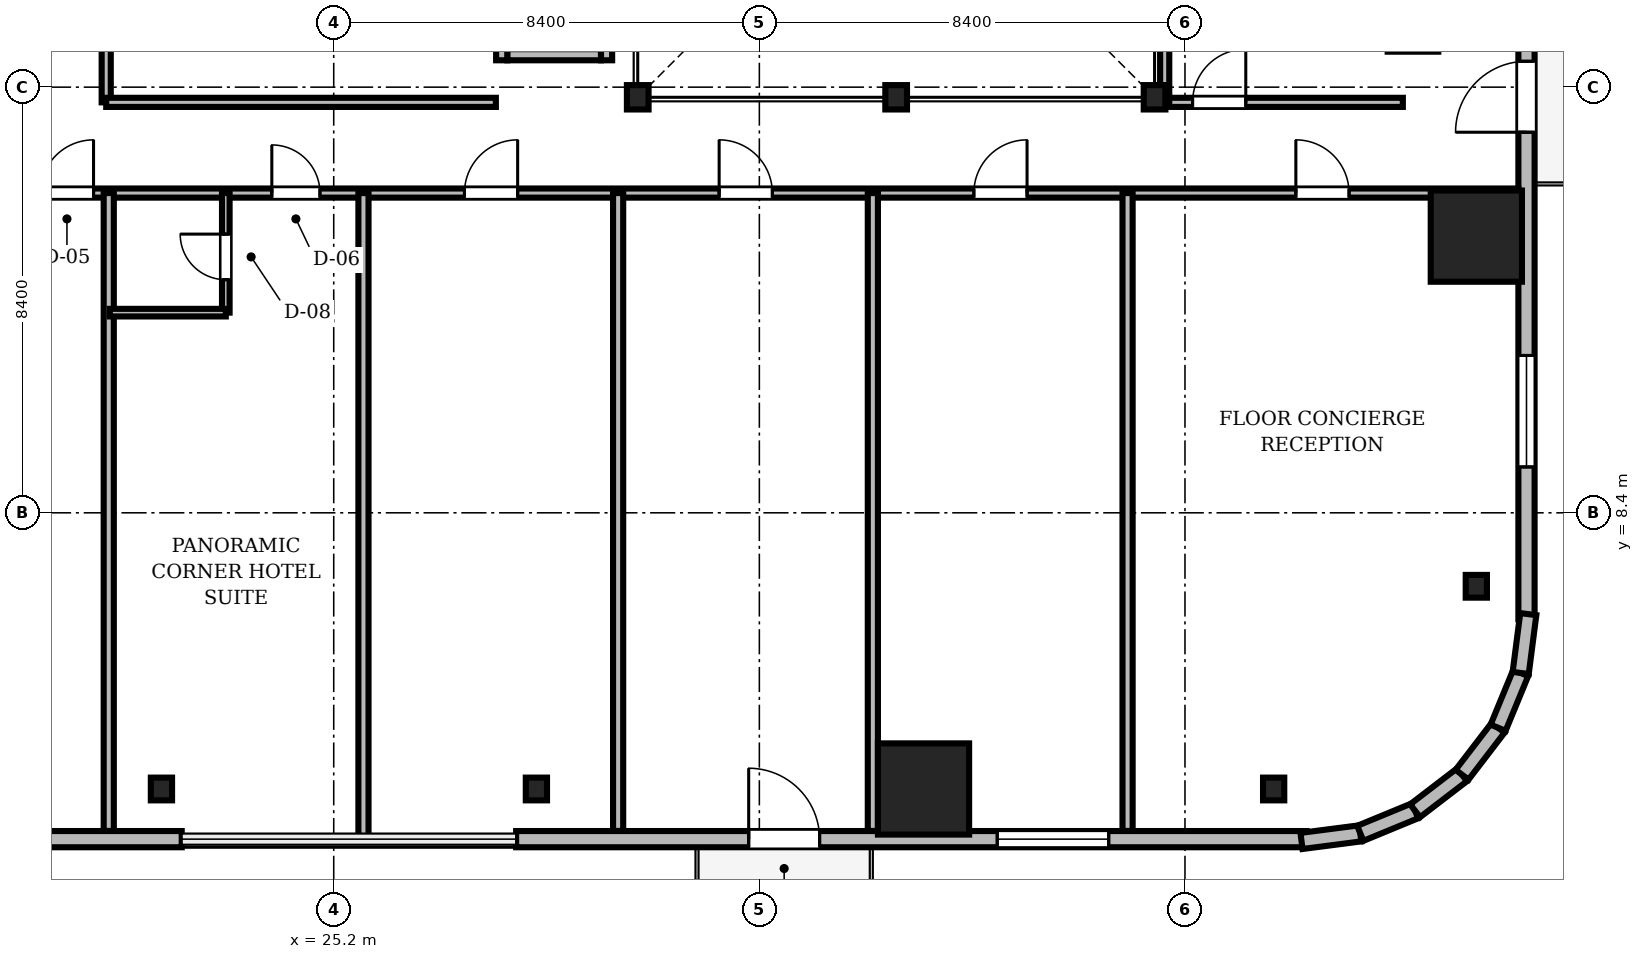
"""IFC4 building model, lengths in metres.
Left out: names, types, materials, properties, quantities, classifications, styles, units other than length and angle.
Written with IfcOpenShell. Run it as: python <this file> out.ifc"""

import sys

from ifc_helpers import new_model, si_unit, direction, frame, frame_2d, origin, origin_2d, place, context, subcontext, project, spatial, rectangle, i_section, extrude, source, transform, mapped, element, fill, save


model = new_model("IFC4")
c1 = context("Model", 3, precision=1e-05, world=origin(), true_north=direction((0.0, 1.0)))
c2 = subcontext(c1, "Body", "Model", "MODEL_VIEW")
j1 = project(units=[si_unit("LENGTHUNIT", "METRE"), si_unit("PLANEANGLEUNIT", "RADIAN")], contexts=[c1])
p1 = place(None, origin())
s1 = spatial("IfcSite", under=j1, at=p1, CompositionType="ELEMENT")
p2 = place(p1, origin())
s2 = spatial("IfcBuilding", under=s1, at=p2, CompositionType="ELEMENT")
p3 = place(p2, frame((0.0, 0.0, 38.55)))
s3 = spatial("IfcBuildingStorey", under=s2, at=p3, CompositionType="ELEMENT", Elevation=38.55)
m1 = source(origin(), c2, "Body", "SweptSolid", [
    extrude(i_section(OverallWidth=0.428, OverallDepth=0.481, WebThickness=0.04, FlangeThickness=0.063, FilletRadius=0.015, at=origin_2d()), origin(), (0.0, 0.0, 1.0), 3.41),
])
for number, where, z_axis, x_axis in (
    (1, (31.2, 16.6, 0.0), (0.0, 0.0, 1.0), (1.0, 0.0, 0.0)),
    (2, (36.3, 16.6, 0.0), (0.0, 0.0, 1.0), (1.0, 0.0, 0.0)),
    (3, (41.4, 16.6, 0.0), (0.0, 0.0, 1.0), (1.0, 0.0, 0.0)),
):
    element("IfcColumn", number, at=place(p3, frame(where, z_axis=z_axis, x_axis=x_axis)), inside=s3, PredefinedType="COLUMN", context=c2, shape_type="MappedRepresentation", body=[
        mapped(m1, transform((0.0, 0.0, 0.0), scale=1.0)),
    ])
m2 = source(origin(), c2, "Body", "SweptSolid", [
    extrude(rectangle(XDim=1.8, YDim=1.8, at=origin_2d()), origin(), (0.0, 0.0, 1.0), 3.41),
])
for number, where, z_axis, x_axis in (
    (4, (36.84, 2.95, 0.0), (0.0, 0.0, 1.0), (1.0, 0.0, 0.0)),
    (5, (47.75, 13.86, 0.0), (0.0, 0.0, 1.0), (1.0, 0.0, 0.0)),
):
    element("IfcColumn", number, at=place(p3, frame(where, z_axis=z_axis, x_axis=x_axis)), inside=s3, PredefinedType="COLUMN", context=c2, shape_type="MappedRepresentation", body=[
        mapped(m2, transform((0.0, 0.0, 0.0), scale=1.0)),
    ])
m3 = source(origin(), c2, "Body", "SweptSolid", [
    extrude(i_section(OverallWidth=0.419, OverallDepth=0.449, WebThickness=0.031, FlangeThickness=0.048, FilletRadius=0.015, at=origin_2d()), origin(), (0.0, 0.0, 1.0), 3.41),
])
for number, where, z_axis, x_axis in (
    (6, (21.8, 2.95, 0.0), (0.0, 0.0, 1.0), (1.0, 0.0, 0.0)),
    (7, (29.2, 2.95, 0.0), (0.0, 0.0, 1.0), (1.0, 0.0, 0.0)),
    (8, (43.75, 2.95, 0.0), (0.0, 0.0, 1.0), (1.0, 0.0, 0.0)),
    (9, (47.75, 6.95, 0.0), (0.0, 0.0, 1.0), (1.0, 0.0, 0.0)),
):
    element("IfcColumn", number, at=place(p3, frame(where, z_axis=z_axis, x_axis=x_axis)), inside=s3, PredefinedType="COLUMN", context=c2, shape_type="MappedRepresentation", body=[
        mapped(m3, transform((0.0, 0.0, 0.0), scale=1.0)),
    ])
m4 = source(origin(), c2, "Body", "SweptSolid", [
    extrude(rectangle(XDim=15.6, YDim=0.32, at=frame_2d((7.8, 0.0))), origin(), (0.0, 0.0, 1.0), 3.41),
])
p4 = place(p3, frame((6.6, 1.96, 0.0), z_axis=(0.0, 0.0, 1.0), x_axis=(1.0, 0.0, 0.0)))
e10 = element("IfcWall", 10, at=p4, inside=s3, PredefinedType="SOLIDWALL", context=c2, shape_type="MappedRepresentation", body=[
    mapped(m4, transform((0.0, 0.0, 0.0), scale=1.0)),
])
m5 = source(origin(), c2, "Body", "SweptSolid", [
    extrude(rectangle(XDim=2.2, YDim=2.4, at=frame_2d((1.1, 1.2))), frame((0.0, 0.17, 0.0), z_axis=(0.0, -1.0, 0.0), x_axis=(1.0, 0.0, 0.0)), (0.0, 0.0, 1.0), 0.34),
])
p5 = place(p4, frame((3.005, 0.0, 0.72)))
e11 = element("IfcOpeningElement", 11, at=p5, cuts=e10, PredefinedType="OPENING", context=c2, shape_type="MappedRepresentation", body=[
    mapped(m5, transform((0.0, 0.0, 0.0), scale=1.0)),
])
p6 = place(p3, frame((28.8, 1.96, 0.0), z_axis=(0.0, 0.0, 1.0), x_axis=(1.0, 0.0, 0.0)))
e12 = element("IfcWall", 12, at=p6, inside=s3, PredefinedType="SOLIDWALL", context=c2, shape_type="MappedRepresentation", body=[
    mapped(m4, transform((0.0, 0.0, 0.0), scale=1.0)),
])
m6 = source(origin(), c2, "Body", "SweptSolid", [
    extrude(rectangle(XDim=1.4, YDim=2.3, at=frame_2d((0.7, 1.15))), frame((0.0, 0.17, 0.0), z_axis=(0.0, -1.0, 0.0), x_axis=(1.0, 0.0, 0.0)), (0.0, 0.0, 1.0), 0.34),
])
p7 = place(p6, frame((4.59, 0.0, 0.0)))
e13 = element("IfcOpeningElement", 13, at=p7, cuts=e12, PredefinedType="OPENING", context=c2, shape_type="MappedRepresentation", body=[
    mapped(m6, transform((0.0, 0.0, 0.0), scale=1.0)),
])
p8 = place(p6, frame((9.495, 0.0, 0.72)))
e14 = element("IfcOpeningElement", 14, at=p8, cuts=e12, PredefinedType="OPENING", context=c2, shape_type="MappedRepresentation", body=[
    mapped(m5, transform((0.0, 0.0, 0.0), scale=1.0)),
])
p9 = place(p3, frame((48.74, 6.3, 0.0), z_axis=(0.0, 0.0, 1.0), x_axis=(0.0, 1.0, 0.0)))
e15 = element("IfcWall", 15, at=p9, inside=s3, PredefinedType="SOLIDWALL", context=c2, shape_type="MappedRepresentation", body=[
    mapped(m4, transform((0.0, 0.0, 0.0), scale=1.0)),
])
p10 = place(p9, frame((9.61, 0.0, 0.0)))
e16 = element("IfcOpeningElement", 16, at=p10, cuts=e15, PredefinedType="OPENING", context=c2, shape_type="MappedRepresentation", body=[
    mapped(m6, transform((0.0, 0.0, 0.0), scale=1.0)),
])
p11 = place(p9, frame((3.005, 0.0, 0.72)))
e17 = element("IfcOpeningElement", 17, at=p11, cuts=e15, PredefinedType="OPENING", context=c2, shape_type="MappedRepresentation", body=[
    mapped(m5, transform((0.0, 0.0, 0.0), scale=1.0)),
])
m7 = source(origin(), c2, "Body", "SweptSolid", [
    extrude(rectangle(XDim=1.17, YDim=0.32, at=frame_2d((0.585, 0.0))), origin(), (0.0, 0.0, 1.0), 3.41),
])
p12 = place(p3, frame((44.3, 1.925, 0.0), z_axis=(0.0, 0.0, 1.0), x_axis=(0.991762485493, 0.128090485085, 0.0)))
e18 = element("IfcWall", 18, at=p12, inside=s3, PredefinedType="SOLIDWALL", context=c2, shape_type="MappedRepresentation", body=[
    mapped(m7, transform((0.0, 0.0, 0.0), scale=1.0)),
])
m8 = source(origin(), c2, "Body", "SweptSolid", [
    extrude(rectangle(XDim=1.169, YDim=0.32, at=frame_2d((0.585, 0.0))), origin(), (0.0, 0.0, 1.0), 3.41),
])
p13 = place(p3, frame((45.46, 2.074, 0.0), z_axis=(0.0, 0.0, 1.0), x_axis=(0.924479075121, 0.381232789334, 0.0)))
e19 = element("IfcWall", 19, at=p13, inside=s3, PredefinedType="SOLIDWALL", context=c2, shape_type="MappedRepresentation", body=[
    mapped(m8, transform((0.0, 0.0, 0.0), scale=1.0)),
])
m9 = source(origin(), c2, "Body", "SweptSolid", [
    extrude(rectangle(XDim=1.169, YDim=0.32, at=frame_2d((0.584, 0.0))), origin(), (0.0, 0.0, 1.0), 3.41),
])
p14 = place(p3, frame((46.541, 2.52, 0.0), z_axis=(0.0, 0.0, 1.0), x_axis=(0.793663520347, 0.608356981114, 0.0)))
e20 = element("IfcWall", 20, at=p14, inside=s3, PredefinedType="SOLIDWALL", context=c2, shape_type="MappedRepresentation", body=[
    mapped(m9, transform((0.0, 0.0, 0.0), scale=1.0)),
])
m10 = source(origin(), c2, "Body", "SweptSolid", [
    extrude(rectangle(XDim=1.169, YDim=0.32, at=frame_2d((0.584, 0.0))), origin(), (0.0, 0.0, 1.0), 3.41),
])
for number, where, z_axis, x_axis in (
    (21, (47.469, 3.231, 0.0), (0.0, 0.0, 1.0), (0.608, 0.794, 0.0)),
    (22, (48.18, 4.159, 0.0), (0.0, 0.0, 1.0), (0.381, 0.925, 0.0)),
):
    element("IfcWall", number, at=place(p3, frame(where, z_axis=z_axis, x_axis=x_axis)), inside=s3, PredefinedType="SOLIDWALL", context=c2, shape_type="MappedRepresentation", body=[
        mapped(m10, transform((0.0, 0.0, 0.0), scale=1.0)),
    ])
m11 = source(origin(), c2, "Body", "SweptSolid", [
    extrude(rectangle(XDim=1.171, YDim=0.32, at=frame_2d((0.585, 0.0))), origin(), (0.0, 0.0, 1.0), 3.41),
])
p15 = place(p3, frame((48.625, 5.24, 0.0), z_axis=(0.0, 0.0, 1.0), x_axis=(0.128269133229, 0.991739395941, 0.0)))
e23 = element("IfcWall", 23, at=p15, inside=s3, PredefinedType="SOLIDWALL", context=c2, shape_type="MappedRepresentation", body=[
    mapped(m11, transform((0.0, 0.0, 0.0), scale=1.0)),
])
m12 = source(origin(), c2, "Body", "SweptSolid", [
    extrude(rectangle(XDim=1.85, YDim=0.22, at=frame_2d((0.925, 0.0))), origin(), (0.0, 0.0, 1.0), 3.41),
])
p16 = place(p3, frame((28.625, 17.44, 0.0), z_axis=(0.0, 0.0, 1.0), x_axis=(1.0, 0.0, 0.0)))
e24 = element("IfcWall", 24, at=p16, inside=s3, PredefinedType="SOLIDWALL", context=c2, shape_type="MappedRepresentation", body=[
    mapped(m12, transform((0.0, 0.0, 0.0), scale=1.0)),
])
m13 = source(origin(), c2, "Body", "SweptSolid", [
    extrude(rectangle(XDim=2.54, YDim=0.22, at=frame_2d((1.27, 0.0))), origin(), (0.0, 0.0, 1.0), 3.41),
])
for number, where, z_axis, x_axis in (
    (25, (28.515, 17.33, 0.0), (0.0, 0.0, 1.0), (0.0, 1.0, 0.0)),
    (26, (30.585, 17.33, 0.0), (0.0, 0.0, 1.0), (0.0, 1.0, 0.0)),
):
    element("IfcWall", number, at=place(p3, frame(where, z_axis=z_axis, x_axis=x_axis)), inside=s3, PredefinedType="SOLIDWALL", context=c2, shape_type="MappedRepresentation", body=[
        mapped(m13, transform((0.0, 0.0, 0.0), scale=1.0)),
    ])
m14 = source(origin(), c2, "Body", "SweptSolid", [
    extrude(rectangle(XDim=46.156, YDim=0.18, at=frame_2d((23.078, 0.0))), origin(), (0.0, 0.0, 1.0), 2.652),
])
p17 = place(p3, frame((2.422, 14.71, 0.0), z_axis=(0.0, 0.0, 1.0), x_axis=(1.0, 0.0, 0.0)))
e27 = element("IfcWall", 27, at=p17, inside=s3, PredefinedType="PARTITIONING", context=c2, shape_type="MappedRepresentation", body=[
    mapped(m14, transform((0.0, 0.0, 0.0), scale=1.0)),
])
m15 = source(origin(), c2, "Body", "SweptSolid", [
    extrude(rectangle(XDim=1.05, YDim=2.2, at=frame_2d((0.525, 1.1))), frame((0.0, 0.1, 0.0), z_axis=(0.0, -1.0, 0.0), x_axis=(1.0, 0.0, 0.0)), (0.0, 0.0, 1.0), 0.2),
])
p18 = place(p17, frame((16.988, 0.0, 0.0)))
e28 = element("IfcOpeningElement", 28, at=p18, cuts=e27, PredefinedType="OPENING", context=c2, shape_type="MappedRepresentation", body=[
    mapped(m15, transform((0.0, 0.0, 0.0), scale=1.0)),
])
m16 = source(origin(), c2, "Body", "SweptSolid", [
    extrude(rectangle(XDim=0.95, YDim=2.15, at=frame_2d((0.475, 1.075))), frame((0.0, 0.1, 0.0), z_axis=(0.0, -1.0, 0.0), x_axis=(1.0, 0.0, 0.0)), (0.0, 0.0, 1.0), 0.2),
])
p19 = place(p17, frame((21.556, 0.0, 0.0)))
e29 = element("IfcOpeningElement", 29, at=p19, cuts=e27, PredefinedType="OPENING", context=c2, shape_type="MappedRepresentation", body=[
    mapped(m16, transform((0.0, 0.0, 0.0), scale=1.0)),
])
p20 = place(p17, frame((25.358, 0.0, 0.0)))
e30 = element("IfcOpeningElement", 30, at=p20, cuts=e27, PredefinedType="OPENING", context=c2, shape_type="MappedRepresentation", body=[
    mapped(m15, transform((0.0, 0.0, 0.0), scale=1.0)),
])
p21 = place(p17, frame((30.385, 0.0, 0.0)))
e31 = element("IfcOpeningElement", 31, at=p21, cuts=e27, PredefinedType="OPENING", context=c2, shape_type="MappedRepresentation", body=[
    mapped(m15, transform((0.0, 0.0, 0.0), scale=1.0)),
])
p22 = place(p17, frame((35.411, 0.0, 0.0)))
e32 = element("IfcOpeningElement", 32, at=p22, cuts=e27, PredefinedType="OPENING", context=c2, shape_type="MappedRepresentation", body=[
    mapped(m15, transform((0.0, 0.0, 0.0), scale=1.0)),
])
p23 = place(p17, frame((41.766, 0.0, 0.0)))
e33 = element("IfcOpeningElement", 33, at=p23, cuts=e27, PredefinedType="OPENING", context=c2, shape_type="MappedRepresentation", body=[
    mapped(m15, transform((0.0, 0.0, 0.0), scale=1.0)),
])
m17 = source(origin(), c2, "Body", "SweptSolid", [
    extrude(rectangle(XDim=11.94, YDim=0.18, at=frame_2d((5.97, 0.0))), origin(), (0.0, 0.0, 1.0), 2.802),
])
p24 = place(p3, frame((20.71, 16.5, 0.0), z_axis=(0.0, 0.0, 1.0), x_axis=(0.0, 1.0, 0.0)))
e34 = element("IfcWall", 34, at=p24, inside=s3, PredefinedType="PARTITIONING", context=c2, shape_type="MappedRepresentation", body=[
    mapped(m17, transform((0.0, 0.0, 0.0), scale=1.0)),
])
p25 = place(p24, frame((4.5, 0.0, 0.0)))
e35 = element("IfcOpeningElement", 35, at=p25, cuts=e34, PredefinedType="OPENING", context=c2, shape_type="MappedRepresentation", body=[
    mapped(m15, transform((0.0, 0.0, 0.0), scale=1.0)),
])
m18 = source(origin(), c2, "Body", "SweptSolid", [
    extrude(rectangle(XDim=4.7, YDim=0.18, at=frame_2d((2.35, 0.0))), origin(), (0.0, 0.0, 1.0), 2.802),
])
p26 = place(p3, frame((41.6, 16.5, 0.0), z_axis=(0.0, 0.0, 1.0), x_axis=(1.0, 0.0, 0.0)))
e36 = element("IfcWall", 36, at=p26, inside=s3, PredefinedType="PARTITIONING", context=c2, shape_type="MappedRepresentation", body=[
    mapped(m18, transform((0.0, 0.0, 0.0), scale=1.0)),
])
p27 = place(p26, frame((0.55, 0.0, 0.0)))
e37 = element("IfcOpeningElement", 37, at=p27, cuts=e36, PredefinedType="OPENING", context=c2, shape_type="MappedRepresentation", body=[
    mapped(m15, transform((0.0, 0.0, 0.0), scale=1.0)),
])
m19 = source(origin(), c2, "Body", "SweptSolid", [
    extrude(rectangle(XDim=2.36, YDim=0.15, at=frame_2d((1.18, 0.0))), origin(), (0.0, 0.0, 1.0), 3.41),
])
p28 = place(p3, frame((23.07, 12.35, 0.0), z_axis=(0.0, 0.0, 1.0), x_axis=(0.0, 1.0, 0.0)))
e38 = element("IfcWall", 38, at=p28, inside=s3, PredefinedType="PARTITIONING", context=c2, shape_type="MappedRepresentation", body=[
    mapped(m19, transform((0.0, 0.0, 0.0), scale=1.0)),
])
m20 = source(origin(), c2, "Body", "SweptSolid", [
    extrude(rectangle(XDim=0.9, YDim=2.1, at=frame_2d((0.45, 1.05))), frame((0.0, 0.085, 0.0), z_axis=(0.0, -1.0, 0.0), x_axis=(1.0, 0.0, 0.0)), (0.0, 0.0, 1.0), 0.17),
])
p29 = place(p28, frame((0.65, 0.0, 0.0)))
e39 = element("IfcOpeningElement", 39, at=p29, cuts=e38, PredefinedType="OPENING", context=c2, shape_type="MappedRepresentation", body=[
    mapped(m20, transform((0.0, 0.0, 0.0), scale=1.0)),
])
m21 = source(origin(), c2, "Body", "SweptSolid", [
    extrude(rectangle(XDim=12.588, YDim=0.2, at=frame_2d((6.294, 0.0))), origin(), (0.0, 0.0, 1.0), 2.652),
])
p30 = place(p3, frame((20.76, 2.122, 0.0), z_axis=(0.0, 0.0, 1.0), x_axis=(0.0, 1.0, 0.0)))
e40 = element("IfcWall", 40, at=p30, inside=s3, PredefinedType="PARTITIONING", context=c2, shape_type="MappedRepresentation", body=[
    mapped(m21, transform((0.0, 0.0, 0.0), scale=1.0)),
])
m22 = source(origin(), c2, "Body", "SweptSolid", [
    extrude(rectangle(XDim=12.78, YDim=0.2, at=frame_2d((6.39, 0.0))), origin(), (0.0, 0.0, 1.0), 2.652),
])
p31 = place(p3, frame((25.787, 1.93, 0.0), z_axis=(0.0, 0.0, 1.0), x_axis=(0.0, 1.0, 0.0)))
e41 = element("IfcWall", 41, at=p31, inside=s3, PredefinedType="PARTITIONING", context=c2, shape_type="MappedRepresentation", body=[
    mapped(m22, transform((0.0, 0.0, 0.0), scale=1.0)),
])
for number, where, z_axis, x_axis in (
    (42, (30.813, 2.122, 0.0), (0.0, 0.0, 1.0), (0.0, 1.0, 0.0)),
    (43, (35.84, 2.122, 0.0), (0.0, 0.0, 1.0), (0.0, 1.0, 0.0)),
    (44, (40.867, 2.122, 0.0), (0.0, 0.0, 1.0), (0.0, 1.0, 0.0)),
):
    element("IfcWall", number, at=place(p3, frame(where, z_axis=z_axis, x_axis=x_axis)), inside=s3, PredefinedType="PARTITIONING", context=c2, shape_type="MappedRepresentation", body=[
        mapped(m21, transform((0.0, 0.0, 0.0), scale=1.0)),
    ])
m23 = source(origin(), c2, "Body", "SweptSolid", [
    extrude(rectangle(XDim=7.69, YDim=0.18, at=frame_2d((3.845, 0.0))), origin(), (0.0, 0.0, 1.0), 2.802),
])
p32 = place(p3, frame((20.71, 16.5, 0.0), z_axis=(0.0, 0.0, 1.0), x_axis=(1.0, 0.0, 0.0)))
e45 = element("IfcWall", 45, at=p32, inside=s3, PredefinedType="PARTITIONING", context=c2, shape_type="MappedRepresentation", body=[
    mapped(m23, transform((0.0, 0.0, 0.0), scale=1.0)),
])
m24 = source(origin(), c2, "Body", "SweptSolid", [
    extrude(rectangle(XDim=7.15, YDim=0.18, at=frame_2d((3.575, 0.0))), origin(), (0.0, 0.0, 1.0), 2.802),
])
p33 = place(p3, frame((41.6, 16.5, 0.0), z_axis=(0.0, 0.0, 1.0), x_axis=(0.0, 1.0, 0.0)))
e46 = element("IfcWall", 46, at=p33, inside=s3, PredefinedType="PARTITIONING", context=c2, shape_type="MappedRepresentation", body=[
    mapped(m24, transform((0.0, 0.0, 0.0), scale=1.0)),
])
m25 = source(origin(), c2, "Body", "SweptSolid", [
    extrude(rectangle(XDim=2.29, YDim=0.15, at=frame_2d((1.145, 0.0))), origin(), (0.0, 0.0, 1.0), 3.41),
])
p34 = place(p3, frame((20.78, 12.35, 0.0), z_axis=(0.0, 0.0, 1.0), x_axis=(1.0, 0.0, 0.0)))
e47 = element("IfcWall", 47, at=p34, inside=s3, PredefinedType="PARTITIONING", context=c2, shape_type="MappedRepresentation", body=[
    mapped(m25, transform((0.0, 0.0, 0.0), scale=1.0)),
])
m26 = source(origin(), c2, "Body", "SweptSolid", [
    extrude(rectangle(XDim=1.4, YDim=2.3, at=frame_2d((0.7, 1.15))), frame((0.0, 0.025, 0.0), z_axis=(0.0, -1.0, 0.0), x_axis=(1.0, 0.0, 0.0)), (0.0, 0.0, 1.0), 0.05),
])
p35 = place(p7, frame((1.4, 0.0, 0.0), z_axis=(0.0, 0.0, 1.0), x_axis=(-1.0, 0.0, 0.0)))
e48 = element("IfcDoor", 48, at=p35, inside=s3, OperationType="DOUBLE_DOOR_SLIDING", PredefinedType="DOOR", context=c2, shape_type="MappedRepresentation", body=[
    mapped(m26, transform((0.0, 0.0, 0.0), scale=1.0)),
])
fill(e13, e48)
m27 = source(origin(), c2, "Body", "SweptSolid", [
    extrude(rectangle(XDim=2.2, YDim=2.4, at=frame_2d((1.1, 1.2))), frame((0.0, 0.03, 0.0), z_axis=(0.0, -1.0, 0.0), x_axis=(1.0, 0.0, 0.0)), (0.0, 0.0, 1.0), 0.06),
])
p36 = place(p8, origin())
e49 = element("IfcWindow", 49, at=p36, inside=s3, PartitioningType="SINGLE_PANEL", PredefinedType="WINDOW", context=c2, shape_type="MappedRepresentation", body=[
    mapped(m27, transform((0.0, 0.0, 0.0), scale=1.0)),
])
fill(e14, e49)
p37 = place(p10, frame((1.4, 0.0, 0.0), z_axis=(0.0, 0.0, 1.0), x_axis=(-1.0, 0.0, 0.0)))
e50 = element("IfcDoor", 50, at=p37, inside=s3, OperationType="DOUBLE_DOOR_SLIDING", PredefinedType="DOOR", context=c2, shape_type="MappedRepresentation", body=[
    mapped(m26, transform((0.0, 0.0, 0.0), scale=1.0)),
])
fill(e16, e50)
p38 = place(p11, origin())
e51 = element("IfcWindow", 51, at=p38, inside=s3, PartitioningType="SINGLE_PANEL", PredefinedType="WINDOW", context=c2, shape_type="MappedRepresentation", body=[
    mapped(m27, transform((0.0, 0.0, 0.0), scale=1.0)),
])
fill(e17, e51)
m28 = source(origin(), c2, "Body", "SweptSolid", [
    extrude(rectangle(XDim=1.05, YDim=2.2, at=frame_2d((0.525, 1.1))), frame((0.0, 0.025, 0.0), z_axis=(0.0, -1.0, 0.0), x_axis=(1.0, 0.0, 0.0)), (0.0, 0.0, 1.0), 0.05),
])
p39 = place(p18, origin())
e52 = element("IfcDoor", 52, at=p39, inside=s3, OperationType="SINGLE_SWING_RIGHT", PredefinedType="DOOR", context=c2, shape_type="MappedRepresentation", body=[
    mapped(m28, transform((0.0, 0.0, 0.0), scale=1.0)),
])
fill(e28, e52)
m29 = source(origin(), c2, "Body", "SweptSolid", [
    extrude(rectangle(XDim=0.95, YDim=2.15, at=frame_2d((0.475, 1.075))), frame((0.0, 0.025, 0.0), z_axis=(0.0, -1.0, 0.0), x_axis=(1.0, 0.0, 0.0)), (0.0, 0.0, 1.0), 0.05),
])
p40 = place(p19, origin())
e53 = element("IfcDoor", 53, at=p40, inside=s3, OperationType="SINGLE_SWING_LEFT", PredefinedType="DOOR", context=c2, shape_type="MappedRepresentation", body=[
    mapped(m29, transform((0.0, 0.0, 0.0), scale=1.0)),
])
fill(e29, e53)
p41 = place(p20, origin())
e54 = element("IfcDoor", 54, at=p41, inside=s3, OperationType="SINGLE_SWING_RIGHT", PredefinedType="DOOR", context=c2, shape_type="MappedRepresentation", body=[
    mapped(m28, transform((0.0, 0.0, 0.0), scale=1.0)),
])
fill(e30, e54)
p42 = place(p21, origin())
e55 = element("IfcDoor", 55, at=p42, inside=s3, OperationType="SINGLE_SWING_LEFT", PredefinedType="DOOR", context=c2, shape_type="MappedRepresentation", body=[
    mapped(m28, transform((0.0, 0.0, 0.0), scale=1.0)),
])
fill(e31, e55)
p43 = place(p22, origin())
e56 = element("IfcDoor", 56, at=p43, inside=s3, OperationType="SINGLE_SWING_RIGHT", PredefinedType="DOOR", context=c2, shape_type="MappedRepresentation", body=[
    mapped(m28, transform((0.0, 0.0, 0.0), scale=1.0)),
])
fill(e32, e56)
p44 = place(p23, origin())
e57 = element("IfcDoor", 57, at=p44, inside=s3, OperationType="SINGLE_SWING_LEFT", PredefinedType="DOOR", context=c2, shape_type="MappedRepresentation", body=[
    mapped(m28, transform((0.0, 0.0, 0.0), scale=1.0)),
])
fill(e33, e57)
p45 = place(p27, origin())
e58 = element("IfcDoor", 58, at=p45, inside=s3, OperationType="SINGLE_SWING_RIGHT", PredefinedType="DOOR", context=c2, shape_type="MappedRepresentation", body=[
    mapped(m28, transform((0.0, 0.0, 0.0), scale=1.0)),
])
fill(e37, e58)
m30 = source(origin(), c2, "Body", "SweptSolid", [
    extrude(rectangle(XDim=0.9, YDim=2.1, at=frame_2d((0.45, 1.05))), frame((0.0, 0.025, 0.0), z_axis=(0.0, -1.0, 0.0), x_axis=(1.0, 0.0, 0.0)), (0.0, 0.0, 1.0), 0.05),
])
p46 = place(p29, origin())
e59 = element("IfcDoor", 59, at=p46, inside=s3, OperationType="SINGLE_SWING_RIGHT", PredefinedType="DOOR", context=c2, shape_type="MappedRepresentation", body=[
    mapped(m30, transform((0.0, 0.0, 0.0), scale=1.0)),
])
fill(e39, e59)
save(model, sys.argv[1])
